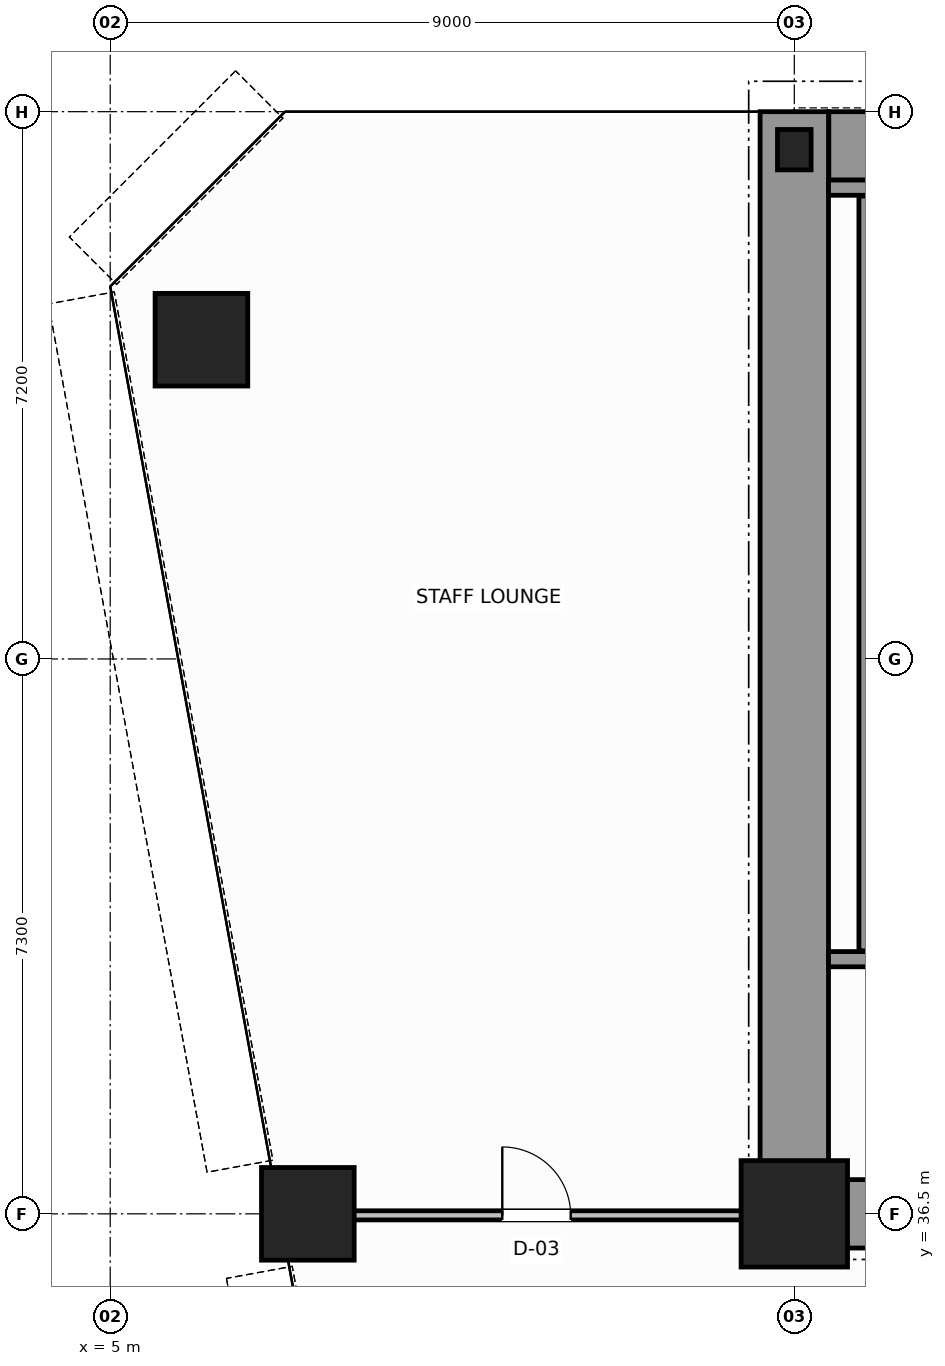
"""IFC4 building model, lengths in metres.
Left out: names, types, materials, properties, quantities, classifications, styles, units other than length and angle.
Written with IfcOpenShell. Run it as: python <this file> out.ifc"""

import sys

from ifc_helpers import new_model, si_unit, direction, frame, frame_2d, origin, origin_2d, place, context, subcontext, project, spatial, rectangle, hollow_circle, i_section, extrude, source, transform, mapped, element, fill, save


model = new_model("IFC4")
c1 = context("Model", 3, precision=1e-05, world=origin(), true_north=direction((0.0, 1.0)))
c2 = subcontext(c1, "Body", "Model", "MODEL_VIEW")
j1 = project(units=[si_unit("LENGTHUNIT", "METRE"), si_unit("PLANEANGLEUNIT", "RADIAN")], contexts=[c1])
p1 = place(None, origin())
s1 = spatial("IfcSite", under=j1, at=p1, CompositionType="ELEMENT")
p2 = place(p1, origin())
s2 = spatial("IfcBuilding", under=s1, at=p2, CompositionType="ELEMENT")
p3 = place(p2, frame((0.0, 0.0, 72.0)))
s3 = spatial("IfcBuildingStorey", under=s2, at=p3, CompositionType="ELEMENT", Elevation=72.0)
m1 = source(origin(), c2, "Body", "SweptSolid", [
    extrude(rectangle(XDim=1.4, YDim=1.4, at=origin_2d()), origin(), (0.0, 0.0, 1.0), 3.8),
])
p4 = place(p3, frame((14.0, 36.5, 0.0), z_axis=(0.0, 0.0, 1.0), x_axis=(1.0, 0.0, 0.0)))
e1 = element("IfcColumn", 1, at=p4, inside=s3, PredefinedType="COLUMN", context=c2, shape_type="MappedRepresentation", body=[
    mapped(m1, transform((0.0, 0.0, 0.0), scale=1.0)),
])
m2 = source(origin(), c2, "Body", "SweptSolid", [
    extrude(i_section(OverallWidth=0.442, OverallDepth=0.531, WebThickness=0.065, FlangeThickness=0.076, FilletRadius=0.015, at=origin_2d()), origin(), (0.0, 0.0, 1.0), 3.8),
])
p5 = place(p3, frame((14.0, 50.5, 0.0), z_axis=(0.0, 0.0, 1.0), x_axis=(1.0, 0.0, 0.0)))
e2 = element("IfcColumn", 2, at=p5, inside=s3, PredefinedType="COLUMN", context=c2, shape_type="MappedRepresentation", body=[
    mapped(m2, transform((0.0, 0.0, 0.0), scale=1.0)),
])
m3 = source(origin(), c2, "Body", "SweptSolid", [
    extrude(hollow_circle(Radius=0.61, WallThickness=0.05, at=origin_2d()), origin(), (0.0, 0.0, 1.0), 3.8),
])
for number, where, z_axis, x_axis in (
    (3, (6.2, 48.0, 0.0), (0.0, 0.0, 1.0), (1.0, 0.0, 0.0)),
    (4, (7.6, 36.5, 0.0), (0.0, 0.0, 1.0), (1.0, 0.0, 0.0)),
):
    element("IfcColumn", number, at=place(p3, frame(where, z_axis=z_axis, x_axis=x_axis)), inside=s3, PredefinedType="COLUMN", context=c2, shape_type="MappedRepresentation", body=[
        mapped(m3, transform((0.0, 0.0, 0.0), scale=1.0)),
    ])
p6 = place(p3, frame((14.454, 50.55, 0.0), z_axis=(0.0, 0.0, 1.0), x_axis=(1.0, 0.0, 0.0)))
e5 = element("IfcWall", 5, at=p6, inside=s3, PredefinedType="SHEAR", context=c2, shape_type="SweptSolid", body=[
    extrude(rectangle(XDim=19.544, YDim=0.9, at=frame_2d((9.772, 0.0))), origin(), (0.0, 0.0, 1.0), 3.8),
])
p7 = place(p3, frame((14.0, 36.5, 0.0), z_axis=(0.0, 0.0, 1.0), x_axis=(0.0, 1.0, 0.0)))
e6 = element("IfcWall", 6, at=p7, inside=s3, PredefinedType="SHEAR", context=c2, shape_type="SweptSolid", body=[
    extrude(rectangle(XDim=14.5, YDim=0.9, at=frame_2d((7.25, 0.0))), origin(), (0.0, 0.0, 1.0), 3.8),
])
p8 = place(p3, frame((14.47, 36.5, 0.0), z_axis=(0.0, 0.0, 1.0), x_axis=(1.0, 0.0, 0.0)))
e7 = element("IfcWall", 7, at=p8, inside=s3, PredefinedType="SHEAR", context=c2, shape_type="SweptSolid", body=[
    extrude(rectangle(XDim=3.73, YDim=0.9, at=frame_2d((1.865, 0.0))), origin(), (0.0, 0.0, 1.0), 2.38),
])
p9 = place(p3, frame((14.45, 39.85, 0.0), z_axis=(0.0, 0.0, 1.0), x_axis=(1.0, 0.0, 0.0)))
e8 = element("IfcWall", 8, at=p9, inside=s3, PredefinedType="SOLIDWALL", context=c2, shape_type="SweptSolid", body=[
    extrude(rectangle(XDim=4.15, YDim=0.2, at=frame_2d((2.075, 0.0))), origin(), (0.0, 0.0, 1.0), 3.8),
])
p10 = place(p9, frame((1.725, 0.0, 0.0)))
e9 = element("IfcOpeningElement", 9, at=p10, cuts=e8, PredefinedType="OPENING", context=c2, shape_type="SweptSolid", body=[
    extrude(rectangle(XDim=1.1, YDim=2.15, at=frame_2d((0.55, 1.075))), frame((0.0, 0.11, 0.0), z_axis=(0.0, -1.0, 0.0), x_axis=(1.0, 0.0, 0.0)), (0.0, 0.0, 1.0), 0.22),
])
p11 = place(p3, frame((14.45, 50.0, 0.0), z_axis=(0.0, 0.0, 1.0), x_axis=(1.0, 0.0, 0.0)))
e10 = element("IfcWall", 10, at=p11, inside=s3, PredefinedType="SOLIDWALL", context=c2, shape_type="SweptSolid", body=[
    extrude(rectangle(XDim=4.15, YDim=0.2, at=frame_2d((2.075, 0.0))), origin(), (0.0, 0.0, 1.0), 3.8),
])
p12 = place(p3, frame((14.95, 39.96, 0.0), z_axis=(0.0, 0.0, 1.0), x_axis=(0.0, 1.0, 0.0)))
e11 = element("IfcWall", 11, at=p12, inside=s3, PredefinedType="SOLIDWALL", context=c2, shape_type="SweptSolid", body=[
    extrude(rectangle(XDim=9.93, YDim=0.2, at=frame_2d((4.965, 0.0))), origin(), (0.0, 0.0, 1.0), 3.8),
])
p13 = place(p3, frame((7.277, 36.48, 0.0), z_axis=(0.0, 0.0, 1.0), x_axis=(1.0, 0.0, 0.0)))
e12 = element("IfcWall", 12, at=p13, inside=s3, PredefinedType="PARTITIONING", context=c2, shape_type="SweptSolid", body=[
    extrude(rectangle(XDim=6.663, YDim=0.12, at=frame_2d((3.332, 0.0))), origin(), (0.0, 0.0, 1.0), 2.77),
])
p14 = place(p13, frame((2.881, 0.0, 0.0)))
e13 = element("IfcOpeningElement", 13, at=p14, cuts=e12, PredefinedType="OPENING", context=c2, shape_type="SweptSolid", body=[
    extrude(rectangle(XDim=0.9, YDim=2.15, at=frame_2d((0.45, 1.075))), frame((0.0, 0.07, 0.0), z_axis=(0.0, -1.0, 0.0), x_axis=(1.0, 0.0, 0.0)), (0.0, 0.0, 1.0), 0.14),
])
m4 = source(origin(), c2, "Body", "SweptSolid", [
    extrude(rectangle(XDim=0.9, YDim=2.15, at=frame_2d((0.45, 1.075))), frame((0.0, 0.025, 0.0), z_axis=(0.0, -1.0, 0.0), x_axis=(1.0, 0.0, 0.0)), (0.0, 0.0, 1.0), 0.05),
])
p15 = place(p14, origin())
e14 = element("IfcDoor", 14, at=p15, inside=s3, OperationType="SINGLE_SWING_LEFT", PredefinedType="DOOR", context=c2, shape_type="MappedRepresentation", body=[
    mapped(m4, transform((0.0, 0.0, 0.0), scale=1.0)),
])
fill(e13, e14)
save(model, sys.argv[1])
